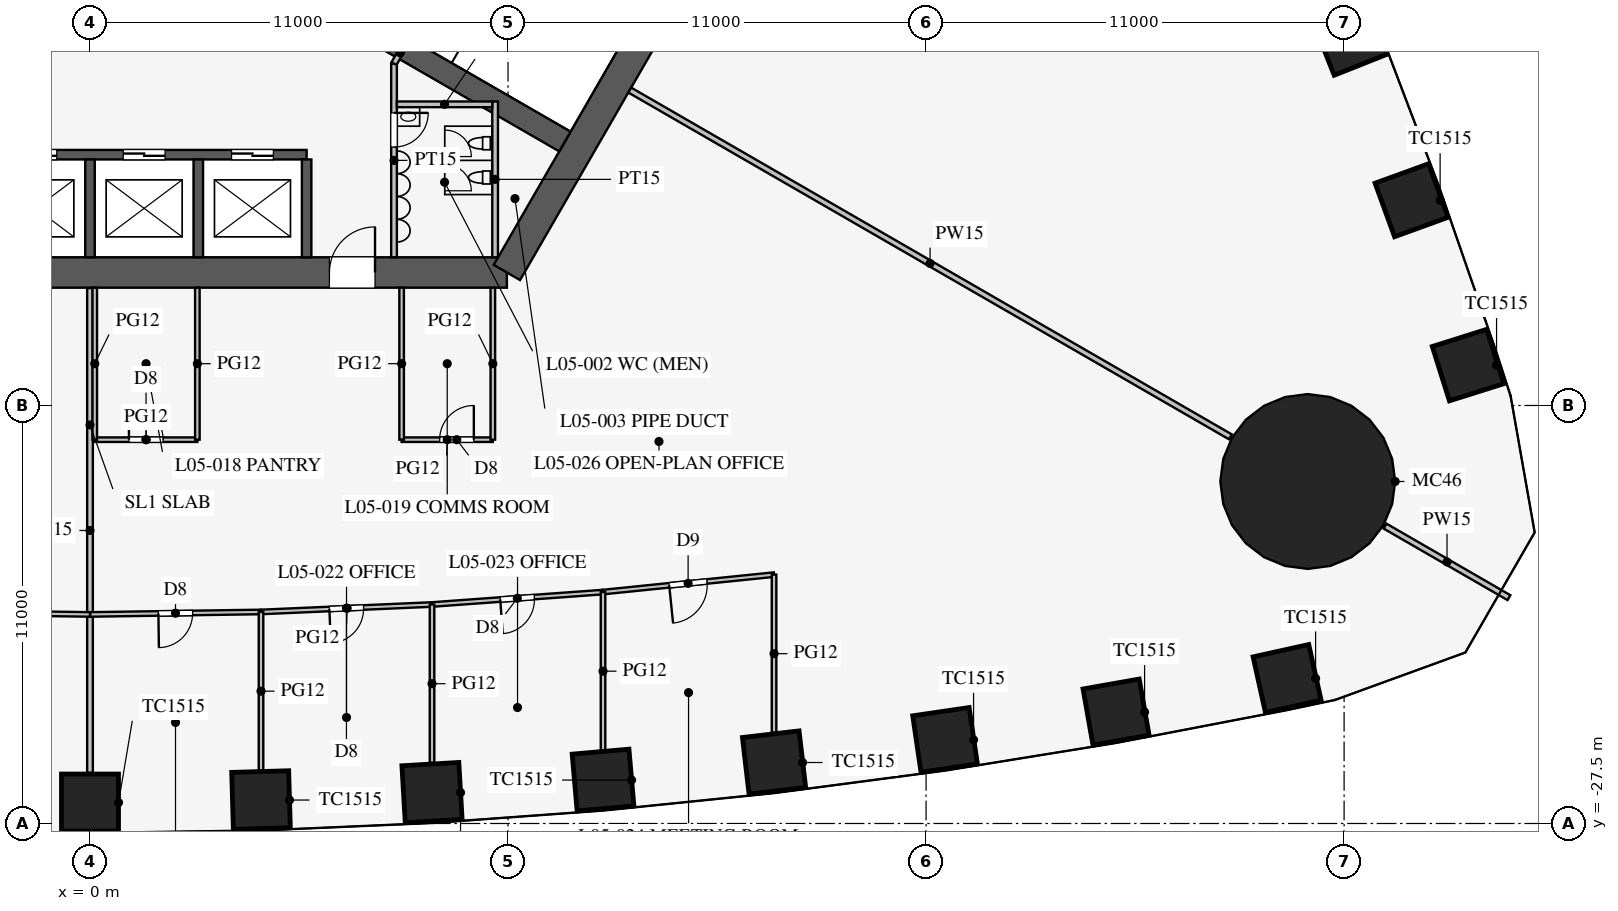
"""IFC4 building model, lengths in metres.
Left out: names, types, materials, properties, quantities, classifications, styles, units other than length and angle.
Written with IfcOpenShell. Run it as: python <this file> out.ifc"""

import sys

from ifc_helpers import new_model, si_unit, direction, frame, frame_2d, origin, origin_2d, place, context, subcontext, project, spatial, rectangle, circle, extrude, element, fill, save


model = new_model("IFC4")
c1 = context("Model", 3, precision=1e-05, world=origin(), true_north=direction((0.0, 1.0)))
c2 = subcontext(c1, "Body", "Model", "MODEL_VIEW")
j1 = project(units=[si_unit("LENGTHUNIT", "METRE"), si_unit("PLANEANGLEUNIT", "RADIAN")], contexts=[c1])
p1 = place(None, origin())
s1 = spatial("IfcSite", under=j1, at=p1, CompositionType="ELEMENT")
p2 = place(p1, origin())
s2 = spatial("IfcBuilding", under=s1, at=p2, CompositionType="ELEMENT")
p3 = place(p2, frame((0.0, 0.0, 24.9)))
s3 = spatial("IfcBuildingStorey", under=s2, at=p3, CompositionType="ELEMENT", Elevation=24.9)
for number, where, z_axis, x_axis in (
    (1, (0.0, -26.949, 0.0), (0.0, 0.0, 1.0), (1.0, 0.0, 0.0)),
    (2, (4.5, -26.883, 0.0), (0.0, 0.0, 1.0), (1.0, 0.029, 0.0)),
    (3, (9.0, -26.686, 0.0), (0.0, 0.0, 1.0), (0.998, 0.058, 0.0)),
    (4, (13.5, -26.357, 0.0), (0.0, 0.0, 1.0), (0.996, 0.087, 0.0)),
    (5, (18.0, -25.895, 0.0), (0.0, 0.0, 1.0), (0.993, 0.116, 0.0)),
    (6, (22.5, -25.299, 0.0), (0.0, 0.0, 1.0), (0.989, 0.145, 0.0)),
    (7, (27.0, -24.568, 0.0), (0.0, 0.0, 1.0), (0.985, 0.174, 0.0)),
    (8, (31.5, -23.685, 0.0), (0.0, 0.0, 1.0), (0.976, 0.217, 0.0)),
    (9, (36.262, -15.438, 0.0), (0.0, 0.0, 1.0), (-0.3, 0.954, 0.0)),
    (10, (34.776, -11.099, 0.0), (0.0, 0.0, 1.0), (-0.342, 0.94, 0.0)),
    (11, (33.16, -6.836, 0.0), (0.0, 0.0, 1.0), (-0.369, 0.929, 0.0)),
):
    element("IfcColumn", number, at=place(p3, frame(where, z_axis=z_axis, x_axis=x_axis)), inside=s3, PredefinedType="COLUMN", context=c2, shape_type="SweptSolid", body=[
        extrude(rectangle(XDim=1.5, YDim=1.5, at=origin_2d()), origin(), (0.0, 0.0, 1.0), 4.2),
    ])
p4 = place(p3, frame((32.043, -18.5, 0.0), z_axis=(0.0, 0.0, 1.0), x_axis=(1.0, 0.0, 0.0)))
e12 = element("IfcColumn", 12, at=p4, inside=s3, PredefinedType="COLUMN", context=c2, shape_type="SweptSolid", body=[
    extrude(circle(Radius=2.3, at=origin_2d()), origin(), (0.0, 0.0, 1.0), 4.2),
])
p5 = place(p3, frame((-10.97, -13.0, 0.0), z_axis=(0.0, 0.0, 1.0), x_axis=(1.0, 0.0, 0.0)))
e13 = element("IfcWall", 13, at=p5, inside=s3, PredefinedType="SHEAR", context=c2, shape_type="SweptSolid", body=[
    extrude(rectangle(XDim=21.939, YDim=0.8, at=frame_2d((10.97, 0.0))), origin(), (0.0, 0.0, 1.0), 4.2),
])
p6 = place(p5, frame((17.27, 0.0, 0.0)))
e14 = element("IfcOpeningElement", 14, at=p6, cuts=e13, PredefinedType="OPENING", context=c2, shape_type="SweptSolid", body=[
    extrude(rectangle(XDim=1.2, YDim=2.1, at=frame_2d((0.6, 1.05))), frame((0.0, 0.41, 0.0), z_axis=(0.0, -1.0, 0.0), x_axis=(1.0, 0.0, 0.0)), (0.0, 0.0, 1.0), 0.82),
])
p7 = place(p5, frame((3.47, 0.0, 0.0)))
e15 = element("IfcOpeningElement", 15, at=p7, cuts=e13, PredefinedType="OPENING", context=c2, shape_type="SweptSolid", body=[
    extrude(rectangle(XDim=1.2, YDim=2.1, at=frame_2d((0.6, 1.05))), frame((0.0, 0.41, 0.0), z_axis=(0.0, -1.0, 0.0), x_axis=(1.0, 0.0, 0.0)), (0.0, 0.0, 1.0), 0.82),
])
p8 = place(p3, frame((10.97, -13.0, 0.0), z_axis=(0.0, 0.0, 1.0), x_axis=(0.499995765644, 0.866027848477, 0.0)))
e16 = element("IfcWall", 16, at=p8, inside=s3, PredefinedType="SHEAR", context=c2, shape_type="SweptSolid", body=[
    extrude(rectangle(XDim=11.547, YDim=0.8, at=frame_2d((5.773, 0.0))), origin(), (0.0, 0.0, 1.0), 4.2),
])
p9 = place(p3, frame((-5.7, -9.9, 0.0), z_axis=(0.0, 0.0, 1.0), x_axis=(1.0, 0.0, 0.0)))
e17 = element("IfcWall", 17, at=p9, inside=s3, PredefinedType="SHEAR", context=c2, shape_type="SweptSolid", body=[
    extrude(rectangle(XDim=11.4, YDim=0.25, at=frame_2d((5.7, 0.0))), origin(), (0.0, 0.0, 1.0), 4.2),
])
p10 = place(p9, frame((0.875, 0.0, 0.0)))
e18 = element("IfcOpeningElement", 18, at=p10, cuts=e17, PredefinedType="OPENING", context=c2, shape_type="SweptSolid", body=[
    extrude(rectangle(XDim=1.1, YDim=2.2, at=frame_2d((0.55, 1.1))), frame((0.0, 0.135, 0.0), z_axis=(0.0, -1.0, 0.0), x_axis=(1.0, 0.0, 0.0)), (0.0, 0.0, 1.0), 0.27),
])
p11 = place(p9, frame((3.725, 0.0, 0.0)))
e19 = element("IfcOpeningElement", 19, at=p11, cuts=e17, PredefinedType="OPENING", context=c2, shape_type="SweptSolid", body=[
    extrude(rectangle(XDim=1.1, YDim=2.2, at=frame_2d((0.55, 1.1))), frame((0.0, 0.135, 0.0), z_axis=(0.0, -1.0, 0.0), x_axis=(1.0, 0.0, 0.0)), (0.0, 0.0, 1.0), 0.27),
])
p12 = place(p9, frame((6.575, 0.0, 0.0)))
e20 = element("IfcOpeningElement", 20, at=p12, cuts=e17, PredefinedType="OPENING", context=c2, shape_type="SweptSolid", body=[
    extrude(rectangle(XDim=1.1, YDim=2.2, at=frame_2d((0.55, 1.1))), frame((0.0, 0.135, 0.0), z_axis=(0.0, -1.0, 0.0), x_axis=(1.0, 0.0, 0.0)), (0.0, 0.0, 1.0), 0.27),
])
p13 = place(p9, frame((9.425, 0.0, 0.0)))
e21 = element("IfcOpeningElement", 21, at=p13, cuts=e17, PredefinedType="OPENING", context=c2, shape_type="SweptSolid", body=[
    extrude(rectangle(XDim=1.1, YDim=2.2, at=frame_2d((0.55, 1.1))), frame((0.0, 0.135, 0.0), z_axis=(0.0, -1.0, 0.0), x_axis=(1.0, 0.0, 0.0)), (0.0, 0.0, 1.0), 0.27),
])
for number, where, z_axis, x_axis in (
    (22, (0.0, -10.025, 0.0), (0.0, 0.0, 1.0), (0.0, -1.0, 0.0)),
    (23, (2.85, -10.025, 0.0), (0.0, 0.0, 1.0), (0.0, -1.0, 0.0)),
    (24, (5.7, -10.025, 0.0), (0.0, 0.0, 1.0), (0.0, -1.0, 0.0)),
):
    element("IfcWall", number, at=place(p3, frame(where, z_axis=z_axis, x_axis=x_axis)), inside=s3, PredefinedType="SHEAR", context=c2, shape_type="SweptSolid", body=[
        extrude(rectangle(XDim=2.575, YDim=0.25, at=frame_2d((1.288, 0.0))), origin(), (0.0, 0.0, 1.0), 4.2),
    ])
p14 = place(p3, frame((4.638, -5.016, 0.0), z_axis=(0.0, 0.0, 1.0), x_axis=(0.866019375473, -0.500010441196, 0.0)))
e25 = element("IfcWall", 25, at=p14, inside=s3, PredefinedType="SHEAR", context=c2, shape_type="SweptSolid", body=[
    extrude(rectangle(XDim=9.075, YDim=0.6, at=frame_2d((4.538, 0.0))), origin(), (0.0, 0.0, 1.0), 4.2),
])
p15 = place(p3, frame((8.0, -7.5, 0.0), z_axis=(0.0, 0.0, 1.0), x_axis=(0.0, -1.0, 0.0)))
e26 = element("IfcWall", 26, at=p15, inside=s3, PredefinedType="PARTITIONING", context=c2, shape_type="SweptSolid", body=[
    extrude(rectangle(XDim=5.1, YDim=0.15, at=frame_2d((2.55, 0.0))), origin(), (0.0, 0.0, 1.0), 4.0),
])
p16 = place(p15, frame((1.3, 0.0, 0.0)))
e27 = element("IfcOpeningElement", 27, at=p16, cuts=e26, PredefinedType="OPENING", context=c2, shape_type="SweptSolid", body=[
    extrude(rectangle(XDim=0.9, YDim=2.1, at=frame_2d((0.45, 1.05))), frame((0.0, 0.085, 0.0), z_axis=(0.0, -1.0, 0.0), x_axis=(1.0, 0.0, 0.0)), (0.0, 0.0, 1.0), 0.17),
])
p17 = place(p3, frame((8.0, -7.5, 0.0), z_axis=(0.0, 0.0, 1.0), x_axis=(0.499842556608, 0.866116284689, 0.0)))
e28 = element("IfcWall", 28, at=p17, inside=s3, PredefinedType="PARTITIONING", context=c2, shape_type="SweptSolid", body=[
    extrude(rectangle(XDim=0.645, YDim=0.15, at=frame_2d((0.323, 0.0))), origin(), (0.0, 0.0, 1.0), 4.0),
])
p18 = place(p3, frame((10.66, -8.5, 0.0), z_axis=(0.0, 0.0, 1.0), x_axis=(0.0, -1.0, 0.0)))
e29 = element("IfcWall", 29, at=p18, inside=s3, PredefinedType="PARTITIONING", context=c2, shape_type="SweptSolid", body=[
    extrude(rectangle(XDim=4.1, YDim=0.15, at=frame_2d((2.05, 0.0))), origin(), (0.0, 0.0, 1.0), 4.0),
])
p19 = place(p3, frame((8.075, -8.575, 0.0), z_axis=(0.0, 0.0, 1.0), x_axis=(1.0, 0.0, 0.0)))
e30 = element("IfcWall", 30, at=p19, inside=s3, PredefinedType="PARTITIONING", context=c2, shape_type="SweptSolid", body=[
    extrude(rectangle(XDim=2.51, YDim=0.15, at=frame_2d((1.255, 0.0))), origin(), (0.0, 0.0, 1.0), 4.0),
])
p20 = place(p3, frame((14.203, -8.2, 0.0), z_axis=(0.0, 0.0, 1.0), x_axis=(0.866024965723, -0.500000758745, 0.0)))
e31 = element("IfcWall", 31, at=p20, inside=s3, PredefinedType="PARTITIONING", context=c2, shape_type="SweptSolid", body=[
    extrude(rectangle(XDim=18.25, YDim=0.15, at=frame_2d((9.125, 0.0))), origin(), (0.0, 0.0, 1.0), 2.3),
])
p21 = place(p3, frame((34.078, -19.675, 0.0), z_axis=(0.0, 0.0, 1.0), x_axis=(0.866019247219, -0.500010663332, 0.0)))
e32 = element("IfcWall", 32, at=p21, inside=s3, PredefinedType="PARTITIONING", context=c2, shape_type="SweptSolid", body=[
    extrude(rectangle(XDim=3.764, YDim=0.15, at=frame_2d((1.882, 0.0))), origin(), (0.0, 0.0, 1.0), 2.3),
])
p22 = place(p3, frame((0.0, -13.41, 0.0), z_axis=(0.0, 0.0, 1.0), x_axis=(0.0, -1.0, 0.0)))
e33 = element("IfcWall", 33, at=p22, inside=s3, PredefinedType="PARTITIONING", context=c2, shape_type="SweptSolid", body=[
    extrude(rectangle(XDim=12.759, YDim=0.15, at=frame_2d((6.379, 0.0))), origin(), (0.0, 0.0, 1.0), 3.2),
])
p23 = place(p3, frame((0.125, -17.4, 0.0), z_axis=(0.0, 0.0, 1.0), x_axis=(1.0, 0.0, 0.0)))
e34 = element("IfcWall", 34, at=p23, inside=s3, PredefinedType="PARTITIONING", context=c2, shape_type="SweptSolid", body=[
    extrude(rectangle(XDim=2.7, YDim=0.12, at=frame_2d((1.35, 0.0))), origin(), (0.0, 0.0, 1.0), 2.9),
])
p24 = place(p23, frame((0.9, 0.0, 0.15)))
e35 = element("IfcOpeningElement", 35, at=p24, cuts=e34, PredefinedType="OPENING", context=c2, shape_type="SweptSolid", body=[
    extrude(rectangle(XDim=0.9, YDim=2.1, at=frame_2d((0.45, 1.05))), frame((0.0, 0.07, 0.0), z_axis=(0.0, -1.0, 0.0), x_axis=(1.0, 0.0, 0.0)), (0.0, 0.0, 1.0), 0.14),
])
p25 = place(p3, frame((8.2, -17.4, 0.0), z_axis=(0.0, 0.0, 1.0), x_axis=(1.0, 0.0, 0.0)))
e36 = element("IfcWall", 36, at=p25, inside=s3, PredefinedType="PARTITIONING", context=c2, shape_type="SweptSolid", body=[
    extrude(rectangle(XDim=2.4, YDim=0.12, at=frame_2d((1.2, 0.0))), origin(), (0.0, 0.0, 1.0), 2.9),
])
p26 = place(p25, frame((1.0, 0.0, 0.15)))
e37 = element("IfcOpeningElement", 37, at=p26, cuts=e36, PredefinedType="OPENING", context=c2, shape_type="SweptSolid", body=[
    extrude(rectangle(XDim=0.9, YDim=2.1, at=frame_2d((0.45, 1.05))), frame((0.0, 0.07, 0.0), z_axis=(0.0, -1.0, 0.0), x_axis=(1.0, 0.0, 0.0)), (0.0, 0.0, 1.0), 0.14),
])
for number, where, z_axis, x_axis in (
    (38, (0.125, -13.4, 0.0), (0.0, 0.0, 1.0), (0.0, -1.0, 0.0)),
    (39, (10.6, -13.4, 0.0), (0.0, 0.0, 1.0), (0.0, -1.0, 0.0)),
    (40, (2.825, -13.4, 0.0), (0.0, 0.0, 1.0), (0.0, -1.0, 0.0)),
    (41, (8.2, -13.4, 0.0), (0.0, 0.0, 1.0), (0.0, -1.0, 0.0)),
):
    element("IfcWall", number, at=place(p3, frame(where, z_axis=z_axis, x_axis=x_axis)), inside=s3, PredefinedType="PARTITIONING", context=c2, shape_type="SweptSolid", body=[
        extrude(rectangle(XDim=4.0, YDim=0.12, at=frame_2d((2.0, 0.0))), origin(), (0.0, 0.0, 1.0), 2.9),
    ])
p27 = place(p3, frame((0.0, -21.999, 0.0), z_axis=(0.0, 0.0, 1.0), x_axis=(0.999894311967, 0.014538393859, 0.0)))
e42 = element("IfcWall", 42, at=p27, inside=s3, PredefinedType="PARTITIONING", context=c2, shape_type="SweptSolid", body=[
    extrude(rectangle(XDim=4.5, YDim=0.12, at=frame_2d((2.25, 0.0))), origin(), (0.0, 0.0, 1.0), 2.9),
])
p28 = place(p27, frame((1.8, 0.0, 0.15)))
e43 = element("IfcOpeningElement", 43, at=p28, cuts=e42, PredefinedType="OPENING", context=c2, shape_type="SweptSolid", body=[
    extrude(rectangle(XDim=0.9, YDim=2.1, at=frame_2d((0.45, 1.05))), frame((0.0, 0.07, 0.0), z_axis=(0.0, -1.0, 0.0), x_axis=(1.0, 0.0, 0.0)), (0.0, 0.0, 1.0), 0.14),
])
p29 = place(p3, frame((13.5, -21.41, 0.0), z_axis=(0.0, 0.0, 1.0), x_axis=(0.994833141332, 0.101523499286, 0.0)))
e44 = element("IfcWall", 44, at=p29, inside=s3, PredefinedType="PARTITIONING", context=c2, shape_type="SweptSolid", body=[
    extrude(rectangle(XDim=4.523, YDim=0.12, at=frame_2d((2.262, 0.0))), origin(), (0.0, 0.0, 1.0), 2.9),
])
p30 = place(p29, frame((1.75, 0.0, 0.15)))
e45 = element("IfcOpeningElement", 45, at=p30, cuts=e44, PredefinedType="OPENING", context=c2, shape_type="SweptSolid", body=[
    extrude(rectangle(XDim=1.0, YDim=2.1, at=frame_2d((0.5, 1.05))), frame((0.0, 0.07, 0.0), z_axis=(0.0, -1.0, 0.0), x_axis=(1.0, 0.0, 0.0)), (0.0, 0.0, 1.0), 0.14),
])
p31 = place(p3, frame((4.5, -21.933, 0.0), z_axis=(0.0, 0.0, 1.0), x_axis=(0.999052370647, 0.043524254212, 0.0)))
e46 = element("IfcWall", 46, at=p31, inside=s3, PredefinedType="PARTITIONING", context=c2, shape_type="SweptSolid", body=[
    extrude(rectangle(XDim=4.504, YDim=0.12, at=frame_2d((2.252, 0.0))), origin(), (0.0, 0.0, 1.0), 2.9),
])
p32 = place(p31, frame((1.8, 0.0, 0.15)))
e47 = element("IfcOpeningElement", 47, at=p32, cuts=e46, PredefinedType="OPENING", context=c2, shape_type="SweptSolid", body=[
    extrude(rectangle(XDim=0.9, YDim=2.1, at=frame_2d((0.45, 1.05))), frame((0.0, 0.07, 0.0), z_axis=(0.0, -1.0, 0.0), x_axis=(1.0, 0.0, 0.0)), (0.0, 0.0, 1.0), 0.14),
])
p33 = place(p3, frame((9.0, -21.737, 0.0), z_axis=(0.0, 0.0, 1.0), x_axis=(0.997363894896, 0.072562119306, 0.0)))
e48 = element("IfcWall", 48, at=p33, inside=s3, PredefinedType="PARTITIONING", context=c2, shape_type="SweptSolid", body=[
    extrude(rectangle(XDim=4.512, YDim=0.12, at=frame_2d((2.256, 0.0))), origin(), (0.0, 0.0, 1.0), 2.9),
])
p34 = place(p33, frame((1.8, 0.0, 0.15)))
e49 = element("IfcOpeningElement", 49, at=p34, cuts=e48, PredefinedType="OPENING", context=c2, shape_type="SweptSolid", body=[
    extrude(rectangle(XDim=0.9, YDim=2.1, at=frame_2d((0.45, 1.05))), frame((0.0, 0.07, 0.0), z_axis=(0.0, -1.0, 0.0), x_axis=(1.0, 0.0, 0.0)), (0.0, 0.0, 1.0), 0.14),
])
p35 = place(p3, frame((-4.5, -21.933, 0.0), z_axis=(0.0, 0.0, 1.0), x_axis=(0.999894311967, -0.014538393859, 0.0)))
e50 = element("IfcWall", 50, at=p35, inside=s3, PredefinedType="PARTITIONING", context=c2, shape_type="SweptSolid", body=[
    extrude(rectangle(XDim=4.5, YDim=0.12, at=frame_2d((2.25, 0.0))), origin(), (0.0, 0.0, 1.0), 2.9),
])
p36 = place(p35, frame((1.8, 0.0, 0.15)))
e51 = element("IfcOpeningElement", 51, at=p36, cuts=e50, PredefinedType="OPENING", context=c2, shape_type="SweptSolid", body=[
    extrude(rectangle(XDim=0.9, YDim=2.1, at=frame_2d((0.45, 1.05))), frame((0.0, 0.07, 0.0), z_axis=(0.0, -1.0, 0.0), x_axis=(1.0, 0.0, 0.0)), (0.0, 0.0, 1.0), 0.14),
])
p37 = place(p3, frame((13.5, -21.41, 0.0), z_axis=(0.0, 0.0, 1.0), x_axis=(0.0, -1.0, 0.0)))
e52 = element("IfcWall", 52, at=p37, inside=s3, PredefinedType="PARTITIONING", context=c2, shape_type="SweptSolid", body=[
    extrude(rectangle(XDim=4.164, YDim=0.12, at=frame_2d((2.082, 0.0))), origin(), (0.0, 0.0, 1.0), 2.9),
])
p38 = place(p3, frame((18.0, -20.951, 0.0), z_axis=(0.0, 0.0, 1.0), x_axis=(0.0, -1.0, 0.0)))
e53 = element("IfcWall", 53, at=p38, inside=s3, PredefinedType="PARTITIONING", context=c2, shape_type="SweptSolid", body=[
    extrude(rectangle(XDim=4.159, YDim=0.12, at=frame_2d((2.08, 0.0))), origin(), (0.0, 0.0, 1.0), 2.9),
])
p39 = place(p3, frame((4.5, -21.933, 0.0), z_axis=(0.0, 0.0, 1.0), x_axis=(0.0, -1.0, 0.0)))
e54 = element("IfcWall", 54, at=p39, inside=s3, PredefinedType="PARTITIONING", context=c2, shape_type="SweptSolid", body=[
    extrude(rectangle(XDim=4.169, YDim=0.12, at=frame_2d((2.085, 0.0))), origin(), (0.0, 0.0, 1.0), 2.9),
])
p40 = place(p3, frame((9.0, -21.737, 0.0), z_axis=(0.0, 0.0, 1.0), x_axis=(0.0, -1.0, 0.0)))
e55 = element("IfcWall", 55, at=p40, inside=s3, PredefinedType="PARTITIONING", context=c2, shape_type="SweptSolid", body=[
    extrude(rectangle(XDim=4.167, YDim=0.12, at=frame_2d((2.084, 0.0))), origin(), (0.0, 0.0, 1.0), 2.9),
])
p41 = place(p3, frame((-0.016, 30.491, 0.0), z_axis=(0.0, 0.0, 1.0), x_axis=(-0.50000091641, -0.866024874695, 0.0)))
e56 = element("IfcWall", 56, at=p41, inside=s3, PredefinedType="PARTITIONING", context=c2, shape_type="SweptSolid", body=[
    extrude(rectangle(XDim=52.796, YDim=0.12, at=frame_2d((26.398, 0.0))), origin(), (0.0, 0.0, 1.0), 2.9),
])
p42 = place(p41, frame((10.2, 0.0, 0.15)))
e57 = element("IfcOpeningElement", 57, at=p42, cuts=e56, PredefinedType="OPENING", context=c2, shape_type="SweptSolid", body=[
    extrude(rectangle(XDim=1.8, YDim=2.1, at=frame_2d((0.9, 1.05))), frame((0.0, 0.07, 0.0), z_axis=(0.0, -1.0, 0.0), x_axis=(1.0, 0.0, 0.0)), (0.0, 0.0, 1.0), 0.14),
])
p43 = place(p41, frame((40.8, 0.0, 0.15)))
e58 = element("IfcOpeningElement", 58, at=p43, cuts=e56, PredefinedType="OPENING", context=c2, shape_type="SweptSolid", body=[
    extrude(rectangle(XDim=1.8, YDim=2.1, at=frame_2d((0.9, 1.05))), frame((0.0, 0.07, 0.0), z_axis=(0.0, -1.0, 0.0), x_axis=(1.0, 0.0, 0.0)), (0.0, 0.0, 1.0), 0.14),
])
p44 = place(p16, origin())
e59 = element("IfcDoor", 59, at=p44, inside=s3, OperationType="SINGLE_SWING_LEFT", PredefinedType="DOOR", context=c2, shape_type="SweptSolid", body=[
    extrude(rectangle(XDim=0.9, YDim=2.1, at=frame_2d((0.45, 1.05))), frame((0.0, 0.025, 0.0), z_axis=(0.0, -1.0, 0.0), x_axis=(1.0, 0.0, 0.0)), (0.0, 0.0, 1.0), 0.05),
])
fill(e27, e59)
p45 = place(p6, origin())
e60 = element("IfcDoor", 60, at=p45, inside=s3, OperationType="SINGLE_SWING_RIGHT", PredefinedType="DOOR", context=c2, shape_type="SweptSolid", body=[
    extrude(rectangle(XDim=1.2, YDim=2.1, at=frame_2d((0.6, 1.05))), frame((0.0, 0.025, 0.0), z_axis=(0.0, -1.0, 0.0), x_axis=(1.0, 0.0, 0.0)), (0.0, 0.0, 1.0), 0.05),
])
fill(e14, e60)
p46 = place(p24, origin())
e61 = element("IfcDoor", 61, at=p46, inside=s3, OperationType="SINGLE_SWING_LEFT", PredefinedType="DOOR", context=c2, shape_type="SweptSolid", body=[
    extrude(rectangle(XDim=0.9, YDim=2.1, at=frame_2d((0.45, 1.05))), frame((0.0, 0.025, 0.0), z_axis=(0.0, -1.0, 0.0), x_axis=(1.0, 0.0, 0.0)), (0.0, 0.0, 1.0), 0.05),
])
fill(e35, e61)
p47 = place(p26, origin())
e62 = element("IfcDoor", 62, at=p47, inside=s3, OperationType="SINGLE_SWING_RIGHT", PredefinedType="DOOR", context=c2, shape_type="SweptSolid", body=[
    extrude(rectangle(XDim=0.9, YDim=2.1, at=frame_2d((0.45, 1.05))), frame((0.0, 0.025, 0.0), z_axis=(0.0, -1.0, 0.0), x_axis=(1.0, 0.0, 0.0)), (0.0, 0.0, 1.0), 0.05),
])
fill(e37, e62)
p48 = place(p28, frame((0.9, 0.0, 0.0), z_axis=(0.0, 0.0, 1.0), x_axis=(-1.0, 0.0, 0.0)))
e63 = element("IfcDoor", 63, at=p48, inside=s3, OperationType="SINGLE_SWING_RIGHT", PredefinedType="DOOR", context=c2, shape_type="SweptSolid", body=[
    extrude(rectangle(XDim=0.9, YDim=2.1, at=frame_2d((0.45, 1.05))), frame((0.0, 0.025, 0.0), z_axis=(0.0, -1.0, 0.0), x_axis=(1.0, 0.0, 0.0)), (0.0, 0.0, 1.0), 0.05),
])
fill(e43, e63)
p49 = place(p32, frame((0.9, 0.0, 0.0), z_axis=(0.0, 0.0, 1.0), x_axis=(-1.0, 0.0, 0.0)))
e64 = element("IfcDoor", 64, at=p49, inside=s3, OperationType="SINGLE_SWING_RIGHT", PredefinedType="DOOR", context=c2, shape_type="SweptSolid", body=[
    extrude(rectangle(XDim=0.9, YDim=2.1, at=frame_2d((0.45, 1.05))), frame((0.0, 0.025, 0.0), z_axis=(0.0, -1.0, 0.0), x_axis=(1.0, 0.0, 0.0)), (0.0, 0.0, 1.0), 0.05),
])
fill(e47, e64)
p50 = place(p34, frame((0.9, 0.0, 0.0), z_axis=(0.0, 0.0, 1.0), x_axis=(-1.0, 0.0, 0.0)))
e65 = element("IfcDoor", 65, at=p50, inside=s3, OperationType="SINGLE_SWING_RIGHT", PredefinedType="DOOR", context=c2, shape_type="SweptSolid", body=[
    extrude(rectangle(XDim=0.9, YDim=2.1, at=frame_2d((0.45, 1.05))), frame((0.0, 0.025, 0.0), z_axis=(0.0, -1.0, 0.0), x_axis=(1.0, 0.0, 0.0)), (0.0, 0.0, 1.0), 0.05),
])
fill(e49, e65)
p51 = place(p30, frame((1.0, 0.0, 0.0), z_axis=(0.0, 0.0, 1.0), x_axis=(-1.0, 0.0, 0.0)))
e66 = element("IfcDoor", 66, at=p51, inside=s3, OperationType="SINGLE_SWING_RIGHT", PredefinedType="DOOR", context=c2, shape_type="SweptSolid", body=[
    extrude(rectangle(XDim=1.0, YDim=2.1, at=frame_2d((0.5, 1.05))), frame((0.0, 0.025, 0.0), z_axis=(0.0, -1.0, 0.0), x_axis=(1.0, 0.0, 0.0)), (0.0, 0.0, 1.0), 0.05),
])
fill(e45, e66)
p52 = place(p11, origin())
e67 = element("IfcDoor", 67, at=p52, inside=s3, OperationType="DOUBLE_DOOR_SLIDING", PredefinedType="DOOR", context=c2, shape_type="SweptSolid", body=[
    extrude(rectangle(XDim=1.1, YDim=2.2, at=frame_2d((0.55, 1.1))), frame((0.0, 0.025, 0.0), z_axis=(0.0, -1.0, 0.0), x_axis=(1.0, 0.0, 0.0)), (0.0, 0.0, 1.0), 0.05),
])
fill(e19, e67)
p53 = place(p12, origin())
e68 = element("IfcDoor", 68, at=p53, inside=s3, OperationType="DOUBLE_DOOR_SLIDING", PredefinedType="DOOR", context=c2, shape_type="SweptSolid", body=[
    extrude(rectangle(XDim=1.1, YDim=2.2, at=frame_2d((0.55, 1.1))), frame((0.0, 0.025, 0.0), z_axis=(0.0, -1.0, 0.0), x_axis=(1.0, 0.0, 0.0)), (0.0, 0.0, 1.0), 0.05),
])
fill(e20, e68)
p54 = place(p13, origin())
e69 = element("IfcDoor", 69, at=p54, inside=s3, OperationType="DOUBLE_DOOR_SLIDING", PredefinedType="DOOR", context=c2, shape_type="SweptSolid", body=[
    extrude(rectangle(XDim=1.1, YDim=2.2, at=frame_2d((0.55, 1.1))), frame((0.0, 0.025, 0.0), z_axis=(0.0, -1.0, 0.0), x_axis=(1.0, 0.0, 0.0)), (0.0, 0.0, 1.0), 0.05),
])
fill(e21, e69)
save(model, sys.argv[1])
